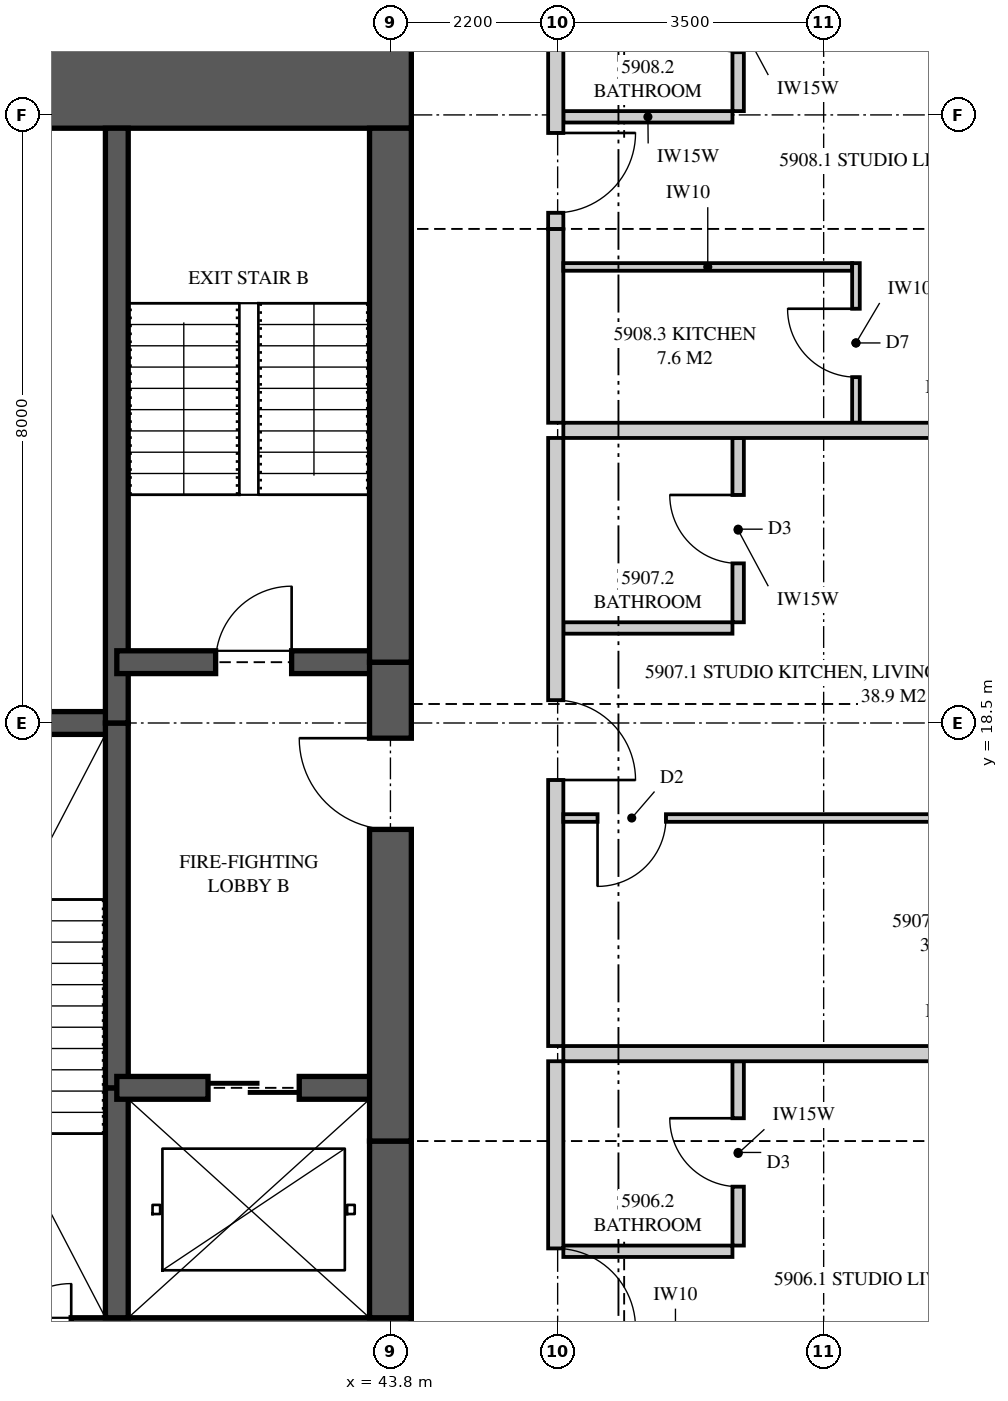
"""IFC4 building model, lengths in metres.
Left out: names, types, materials, properties, quantities, classifications, styles, units other than length and angle.
Written with IfcOpenShell. Run it as: python <this file> out.ifc"""

import sys

from ifc_helpers import new_model, si_unit, direction, frame, frame_2d, origin, place, context, subcontext, project, spatial, polyline, rectangle, outline, extrude, element, fill, save


model = new_model("IFC4")
c1 = context("Model", 3, precision=1e-05, world=origin(), true_north=direction((0.0, 1.0)))
c2 = subcontext(c1, "Body", "Model", "MODEL_VIEW")
j1 = project(units=[si_unit("LENGTHUNIT", "METRE"), si_unit("PLANEANGLEUNIT", "RADIAN")], contexts=[c1])
p1 = place(None, origin())
s1 = spatial("IfcSite", under=j1, at=p1, CompositionType="ELEMENT")
p2 = place(p1, origin())
s2 = spatial("IfcBuilding", under=s1, at=p2, CompositionType="ELEMENT")
p3 = place(p2, frame((0.0, 0.0, 217.95)))
s3 = spatial("IfcBuildingStorey", under=s2, at=p3, CompositionType="ELEMENT", Elevation=217.95)
p4 = place(p3, frame((35.9, 10.125, 0.0), z_axis=(0.0, 0.0, 1.0), x_axis=(1.0, 0.0, 0.0)))
e1 = element("IfcWall", 1, at=p4, inside=s3, PredefinedType="SHEAR", context=c2, shape_type="SweptSolid", body=[
    extrude(rectangle(XDim=8.175, YDim=1.1, at=frame_2d((4.087, 0.0))), origin(), (0.0, 0.0, 1.0), 3.5),
])
p5 = place(p4, frame((2.7, 0.0, 0.0)))
e2 = element("IfcOpeningElement", 2, at=p5, cuts=e1, PredefinedType="OPENING", context=c2, shape_type="SweptSolid", body=[
    extrude(rectangle(XDim=1.0, YDim=2.1, at=frame_2d((0.5, 1.05))), frame((0.0, 0.56, 0.0), z_axis=(0.0, -1.0, 0.0), x_axis=(1.0, 0.0, 0.0)), (0.0, 0.0, 1.0), 1.12),
])
p6 = place(p3, frame((44.075, 26.875, 0.0), z_axis=(0.0, 0.0, 1.0), x_axis=(-1.0, 0.0, 0.0)))
e3 = element("IfcWall", 3, at=p6, inside=s3, PredefinedType="SHEAR", context=c2, shape_type="SweptSolid", body=[
    extrude(rectangle(XDim=8.175, YDim=1.1, at=frame_2d((4.087, 0.0))), origin(), (0.0, 0.0, 1.0), 3.5),
])
p7 = place(p6, frame((5.575, 0.0, 0.0)))
e4 = element("IfcOpeningElement", 4, at=p7, cuts=e3, PredefinedType="OPENING", context=c2, shape_type="SweptSolid", body=[
    extrude(rectangle(XDim=0.9, YDim=2.1, at=frame_2d((0.45, 1.05))), frame((0.0, 0.56, 0.0), z_axis=(0.0, -1.0, 0.0), x_axis=(1.0, 0.0, 0.0)), (0.0, 0.0, 1.0), 1.12),
])
p8 = place(p3, frame((43.8, 10.675, 0.0), z_axis=(0.0, 0.0, 1.0), x_axis=(0.0, 1.0, 0.0)))
e5 = element("IfcWall", 5, at=p8, inside=s3, PredefinedType="SHEAR", context=c2, shape_type="SweptSolid", body=[
    extrude(rectangle(XDim=2.325, YDim=0.55, at=frame_2d((1.163, 0.0))), origin(), (0.0, 0.0, 1.0), 3.5),
])
p9 = place(p3, frame((43.8, 13.0, 0.0), z_axis=(0.0, 0.0, 1.0), x_axis=(0.0, 1.0, 0.0)))
e6 = element("IfcWall", 6, at=p9, inside=s3, PredefinedType="SHEAR", context=c2, shape_type="SweptSolid", body=[
    extrude(rectangle(XDim=6.3, YDim=0.55, at=frame_2d((3.15, 0.0))), origin(), (0.0, 0.0, 1.0), 3.5),
])
p10 = place(p9, frame((4.1, 0.0, 0.0)))
e7 = element("IfcOpeningElement", 7, at=p10, cuts=e6, PredefinedType="OPENING", context=c2, shape_type="SweptSolid", body=[
    extrude(rectangle(XDim=1.2, YDim=2.2, at=frame_2d((0.6, 1.1))), frame((0.0, 0.285, 0.0), z_axis=(0.0, -1.0, 0.0), x_axis=(1.0, 0.0, 0.0)), (0.0, 0.0, 1.0), 0.57),
])
p11 = place(p3, frame((43.8, 19.3, 0.0), z_axis=(0.0, 0.0, 1.0), x_axis=(0.0, 1.0, 0.0)))
e8 = element("IfcWall", 8, at=p11, inside=s3, PredefinedType="SHEAR", context=c2, shape_type="SweptSolid", body=[
    extrude(rectangle(XDim=7.025, YDim=0.55, at=frame_2d((3.512, 0.0))), origin(), (0.0, 0.0, 1.0), 3.5),
])
p12 = place(p3, frame((40.2, 10.675, 0.0), z_axis=(0.0, 0.0, 1.0), x_axis=(0.0, 1.0, 0.0)))
e9 = element("IfcWall", 9, at=p12, inside=s3, PredefinedType="SHEAR", context=c2, shape_type="SweptSolid", body=[
    extrude(rectangle(XDim=3.025, YDim=0.3, at=frame_2d((1.512, 0.0))), origin(), (0.0, 0.0, 1.0), 3.5),
])
p13 = place(p3, frame((40.2, 13.7, 0.0), z_axis=(0.0, 0.0, 1.0), x_axis=(0.0, 1.0, 0.0)))
e10 = element("IfcWall", 10, at=p13, inside=s3, PredefinedType="SHEAR", context=c2, shape_type="SweptSolid", body=[
    extrude(rectangle(XDim=4.8, YDim=0.3, at=frame_2d((2.4, 0.0))), origin(), (0.0, 0.0, 1.0), 3.5),
])
p14 = place(p3, frame((40.2, 18.5, 0.0), z_axis=(0.0, 0.0, 1.0), x_axis=(0.0, 1.0, 0.0)))
e11 = element("IfcWall", 11, at=p14, inside=s3, PredefinedType="SHEAR", context=c2, shape_type="SweptSolid", body=[
    extrude(rectangle(XDim=7.825, YDim=0.3, at=frame_2d((3.913, 0.0))), origin(), (0.0, 0.0, 1.0), 3.5),
])
p15 = place(p3, frame((35.9, 18.5, 0.0), z_axis=(0.0, 0.0, 1.0), x_axis=(1.0, 0.0, 0.0)))
e12 = element("IfcWall", 12, at=p15, inside=s3, PredefinedType="SHEAR", context=c2, shape_type="SweptSolid", body=[
    extrude(rectangle(XDim=4.3, YDim=0.3, at=frame_2d((2.15, 0.0))), origin(), (0.0, 0.0, 1.0), 3.5),
])
p16 = place(p3, frame((40.2, 13.7, 0.0), z_axis=(0.0, 0.0, 1.0), x_axis=(1.0, 0.0, 0.0)))
e13 = element("IfcWall", 13, at=p16, inside=s3, PredefinedType="SHEAR", context=c2, shape_type="SweptSolid", body=[
    extrude(rectangle(XDim=3.6, YDim=0.3, at=frame_2d((1.8, 0.0))), origin(), (0.0, 0.0, 1.0), 3.5),
])
p17 = place(p16, frame((1.2, 0.0, 0.0)))
e14 = element("IfcOpeningElement", 14, at=p17, cuts=e13, PredefinedType="OPENING", context=c2, shape_type="SweptSolid", body=[
    extrude(rectangle(XDim=1.2, YDim=2.1, at=frame_2d((0.6, 1.05))), frame((0.0, 0.16, 0.0), z_axis=(0.0, -1.0, 0.0), x_axis=(1.0, 0.0, 0.0)), (0.0, 0.0, 1.0), 0.32),
])
p18 = place(p3, frame((40.2, 19.3, 0.0), z_axis=(0.0, 0.0, 1.0), x_axis=(1.0, 0.0, 0.0)))
e15 = element("IfcWall", 15, at=p18, inside=s3, PredefinedType="SHEAR", context=c2, shape_type="SweptSolid", body=[
    extrude(rectangle(XDim=3.6, YDim=0.3, at=frame_2d((1.8, 0.0))), origin(), (0.0, 0.0, 1.0), 3.5),
])
p19 = place(p18, frame((1.3, 0.0, 0.0)))
e16 = element("IfcOpeningElement", 16, at=p19, cuts=e15, PredefinedType="OPENING", context=c2, shape_type="SweptSolid", body=[
    extrude(rectangle(XDim=1.0, YDim=2.1, at=frame_2d((0.5, 1.05))), frame((0.0, 0.16, 0.0), z_axis=(0.0, -1.0, 0.0), x_axis=(1.0, 0.0, 0.0)), (0.0, 0.0, 1.0), 0.32),
])
p20 = place(p3, frame((56.325, 14.15, 0.0), z_axis=(0.0, 0.0, 1.0), x_axis=(-1.0, 0.0, 0.0)))
e17 = element("IfcWall", 17, at=p20, inside=s3, PredefinedType="PARTITIONING", context=c2, shape_type="SweptSolid", body=[
    extrude(outline(polyline([(0.529, 2.3), (0.0, 2.3), (0.0, 0.0), (0.529, 0.0), (0.529, 0.28), (1.021, 0.28), (1.021, 0.0), (10.25, 0.0), (10.25, 2.66), (1.685, 2.66), (1.685, 2.3), (1.021, 2.3), (1.021, 1.87), (0.529, 1.87), (0.529, 2.3)])), frame((0.0, 0.1, 0.0), z_axis=(0.0, -1.0, 0.0), x_axis=(1.0, 0.0, 0.0)), (0.0, 0.0, 1.0), 0.2),
])
p21 = place(p3, frame((45.975, 8.025, 0.0), z_axis=(0.0, 0.0, 1.0), x_axis=(0.0, 1.0, 0.0)))
e18 = element("IfcWall", 18, at=p21, inside=s3, PredefinedType="PARTITIONING", context=c2, shape_type="SweptSolid", body=[
    extrude(outline(polyline([(0.0, 0.0), (6.025, 0.0), (6.025, 3.26), (6.025, 2.66), (5.085, 2.66), (0.0, 2.66), (0.0, 3.26), (0.0, 0.0)])), frame((0.0, 0.1, 0.0), z_axis=(0.0, -1.0, 0.0), x_axis=(1.0, 0.0, 0.0)), (0.0, 0.0, 1.0), 0.2),
])
p22 = place(p21, frame((2.512, 0.0, 0.0)))
e19 = element("IfcOpeningElement", 19, at=p22, cuts=e18, PredefinedType="OPENING", context=c2, shape_type="SweptSolid", body=[
    extrude(rectangle(XDim=1.05, YDim=2.2, at=frame_2d((0.525, 1.1))), frame((0.0, 0.11, 0.0), z_axis=(0.0, -1.0, 0.0), x_axis=(1.0, 0.0, 0.0)), (0.0, 0.0, 1.0), 0.22),
])
p23 = place(p3, frame((48.375, 11.625, 0.0), z_axis=(0.0, 0.0, 1.0), x_axis=(0.0, 1.0, 0.0)))
e20 = element("IfcWall", 20, at=p23, inside=s3, PredefinedType="PLUMBINGWALL", context=c2, shape_type="SweptSolid", body=[
    extrude(outline(polyline([(0.0, 0.0), (2.425, 0.0), (2.425, 3.26), (2.425, 2.66), (0.09, 2.66), (0.09, 3.26), (0.0, 3.26), (0.0, 0.0)])), frame((0.0, 0.075, 0.0), z_axis=(0.0, -1.0, 0.0), x_axis=(1.0, 0.0, 0.0)), (0.0, 0.0, 1.0), 0.15),
])
p24 = place(p23, frame((0.775, 0.0, 0.0)))
e21 = element("IfcOpeningElement", 21, at=p24, cuts=e20, PredefinedType="OPENING", context=c2, shape_type="SweptSolid", body=[
    extrude(rectangle(XDim=0.9, YDim=2.1, at=frame_2d((0.45, 1.05))), frame((0.0, 0.085, 0.0), z_axis=(0.0, -1.0, 0.0), x_axis=(1.0, 0.0, 0.0)), (0.0, 0.0, 1.0), 0.17),
])
p25 = place(p3, frame((48.3, 11.55, 0.0), z_axis=(0.0, 0.0, 1.0), x_axis=(-1.0, 0.0, 0.0)))
e22 = element("IfcWall", 22, at=p25, inside=s3, PredefinedType="PLUMBINGWALL", context=c2, shape_type="SweptSolid", body=[
    extrude(outline(polyline([(0.0, 0.0), (2.225, 0.0), (2.225, 3.26), (2.225, 2.66), (0.14, 2.66), (0.14, 3.26), (0.0, 3.26), (0.0, 0.0)])), frame((0.0, 0.075, 0.0), z_axis=(0.0, -1.0, 0.0), x_axis=(1.0, 0.0, 0.0)), (0.0, 0.0, 1.0), 0.15),
])
p26 = place(p3, frame((56.325, 22.35, 0.0), z_axis=(0.0, 0.0, 1.0), x_axis=(-1.0, 0.0, 0.0)))
e23 = element("IfcWall", 23, at=p26, inside=s3, PredefinedType="PARTITIONING", context=c2, shape_type="SweptSolid", body=[
    extrude(outline(polyline([(0.0, 0.0), (10.25, 0.0), (10.25, 3.26), (1.685, 3.26), (1.685, 2.3), (0.0, 2.3), (0.0, 3.26), (0.0, 0.0)])), frame((0.0, 0.1, 0.0), z_axis=(0.0, -1.0, 0.0), x_axis=(1.0, 0.0, 0.0)), (0.0, 0.0, 1.0), 0.2),
])
p27 = place(p3, frame((45.975, 14.25, 0.0), z_axis=(0.0, 0.0, 1.0), x_axis=(0.0, 1.0, 0.0)))
e24 = element("IfcWall", 24, at=p27, inside=s3, PredefinedType="PARTITIONING", context=c2, shape_type="SweptSolid", body=[
    extrude(outline(polyline([(0.0, 0.0), (8.0, 0.0), (8.0, 3.26), (5.81, 3.26), (5.81, 2.66), (3.19, 2.66), (3.19, 3.26), (0.06, 3.26), (0.06, 2.66), (0.0, 2.66), (0.0, 3.26), (0.0, 0.0)])), frame((0.0, 0.1, 0.0), z_axis=(0.0, -1.0, 0.0), x_axis=(1.0, 0.0, 0.0)), (0.0, 0.0, 1.0), 0.2),
])
p28 = place(p27, frame((3.5, 0.0, 0.0)))
e25 = element("IfcOpeningElement", 25, at=p28, cuts=e24, PredefinedType="OPENING", context=c2, shape_type="SweptSolid", body=[
    extrude(rectangle(XDim=1.05, YDim=2.2, at=frame_2d((0.525, 1.1))), frame((0.0, 0.11, 0.0), z_axis=(0.0, -1.0, 0.0), x_axis=(1.0, 0.0, 0.0)), (0.0, 0.0, 1.0), 0.22),
])
p29 = place(p3, frame((48.375, 19.825, 0.0), z_axis=(0.0, 0.0, 1.0), x_axis=(0.0, 1.0, 0.0)))
e26 = element("IfcWall", 26, at=p29, inside=s3, PredefinedType="PLUMBINGWALL", context=c2, shape_type="SweptSolid", body=[
    extrude(outline(polyline([(0.0, 0.0), (2.425, 0.0), (2.425, 3.26), (0.21, 3.26), (0.21, 2.66), (0.0, 2.66), (0.0, 3.26), (0.0, 0.0)])), frame((0.0, 0.075, 0.0), z_axis=(0.0, -1.0, 0.0), x_axis=(1.0, 0.0, 0.0)), (0.0, 0.0, 1.0), 0.15),
])
p30 = place(p29, frame((0.775, 0.0, 0.0)))
e27 = element("IfcOpeningElement", 27, at=p30, cuts=e26, PredefinedType="OPENING", context=c2, shape_type="SweptSolid", body=[
    extrude(rectangle(XDim=0.9, YDim=2.1, at=frame_2d((0.45, 1.05))), frame((0.0, 0.085, 0.0), z_axis=(0.0, -1.0, 0.0), x_axis=(1.0, 0.0, 0.0)), (0.0, 0.0, 1.0), 0.17),
])
p31 = place(p3, frame((48.3, 19.75, 0.0), z_axis=(0.0, 0.0, 1.0), x_axis=(-1.0, 0.0, 0.0)))
e28 = element("IfcWall", 28, at=p31, inside=s3, PredefinedType="PLUMBINGWALL", context=c2, shape_type="SweptSolid", body=[
    extrude(outline(polyline([(0.0, 0.0), (2.225, 0.0), (2.225, 3.26), (2.225, 2.66), (0.0, 2.66), (0.0, 3.26), (0.0, 0.0)])), frame((0.0, 0.075, 0.0), z_axis=(0.0, -1.0, 0.0), x_axis=(1.0, 0.0, 0.0)), (0.0, 0.0, 1.0), 0.15),
])
p32 = place(p3, frame((56.325, 17.25, 0.0), z_axis=(0.0, 0.0, 1.0), x_axis=(-1.0, 0.0, 0.0)))
e29 = element("IfcWall", 29, at=p32, inside=s3, PredefinedType="PARTITIONING", context=c2, shape_type="SweptSolid", body=[
    extrude(outline(polyline([(0.0, 0.0), (10.25, 0.0), (10.25, 3.26), (1.635, 3.26), (1.635, 2.3), (0.0, 2.3), (0.0, 3.26), (0.0, 0.0)])), frame((0.0, 0.05, 0.0), z_axis=(0.0, -1.0, 0.0), x_axis=(1.0, 0.0, 0.0)), (0.0, 0.0, 1.0), 0.1),
])
p33 = place(p32, frame((8.9, 0.0, 0.0)))
e30 = element("IfcOpeningElement", 30, at=p33, cuts=e29, PredefinedType="OPENING", context=c2, shape_type="SweptSolid", body=[
    extrude(rectangle(XDim=0.9, YDim=2.1, at=frame_2d((0.45, 1.05))), frame((0.0, 0.06, 0.0), z_axis=(0.0, -1.0, 0.0), x_axis=(1.0, 0.0, 0.0)), (0.0, 0.0, 1.0), 0.12),
])
p34 = place(p3, frame((45.975, 22.45, 0.0), z_axis=(0.0, 0.0, 1.0), x_axis=(0.0, 1.0, 0.0)))
e31 = element("IfcWall", 31, at=p34, inside=s3, PredefinedType="PARTITIONING", context=c2, shape_type="SweptSolid", body=[
    extrude(outline(polyline([(0.0, 0.0), (2.55, 0.0), (2.55, 2.66), (1.24, 2.66), (1.24, 3.26), (0.0, 3.26), (0.0, 0.0)])), frame((0.0, 0.1, 0.0), z_axis=(0.0, -1.0, 0.0), x_axis=(1.0, 0.0, 0.0)), (0.0, 0.0, 1.0), 0.2),
])
p35 = place(p3, frame((45.975, 25.0, 0.0), z_axis=(0.0, 0.0, 1.0), x_axis=(0.0, 1.0, 0.0)))
e32 = element("IfcWall", 32, at=p35, inside=s3, PredefinedType="PARTITIONING", context=c2, shape_type="SweptSolid", body=[
    extrude(rectangle(XDim=3.975, YDim=0.2, at=frame_2d((1.988, 0.0))), origin(), (0.0, 0.0, 1.0), 2.66),
])
p36 = place(p35, frame((0.212, 0.0, 0.0)))
e33 = element("IfcOpeningElement", 33, at=p36, cuts=e32, PredefinedType="OPENING", context=c2, shape_type="SweptSolid", body=[
    extrude(rectangle(XDim=1.05, YDim=2.2, at=frame_2d((0.525, 1.1))), frame((0.0, 0.11, 0.0), z_axis=(0.0, -1.0, 0.0), x_axis=(1.0, 0.0, 0.0)), (0.0, 0.0, 1.0), 0.22),
])
p37 = place(p3, frame((48.375, 26.55, 0.0), z_axis=(0.0, 0.0, 1.0), x_axis=(0.0, 1.0, 0.0)))
e34 = element("IfcWall", 34, at=p37, inside=s3, PredefinedType="PLUMBINGWALL", context=c2, shape_type="SweptSolid", body=[
    extrude(rectangle(XDim=2.425, YDim=0.15, at=frame_2d((1.212, 0.0))), origin(), (0.0, 0.0, 1.0), 3.26),
])
p38 = place(p37, frame((0.775, 0.0, 0.0)))
e35 = element("IfcOpeningElement", 35, at=p38, cuts=e34, PredefinedType="OPENING", context=c2, shape_type="SweptSolid", body=[
    extrude(rectangle(XDim=0.9, YDim=2.1, at=frame_2d((0.45, 1.05))), frame((0.0, 0.085, 0.0), z_axis=(0.0, -1.0, 0.0), x_axis=(1.0, 0.0, 0.0)), (0.0, 0.0, 1.0), 0.17),
])
p39 = place(p3, frame((48.3, 26.475, 0.0), z_axis=(0.0, 0.0, 1.0), x_axis=(-1.0, 0.0, 0.0)))
e36 = element("IfcWall", 36, at=p39, inside=s3, PredefinedType="PLUMBINGWALL", context=c2, shape_type="SweptSolid", body=[
    extrude(outline(polyline([(0.0, 0.0), (2.225, 0.0), (2.225, 3.26), (2.225, 2.66), (0.14, 2.66), (0.14, 3.26), (0.0, 3.26), (0.0, 0.0)])), frame((0.0, 0.075, 0.0), z_axis=(0.0, -1.0, 0.0), x_axis=(1.0, 0.0, 0.0)), (0.0, 0.0, 1.0), 0.15),
])
p40 = place(p3, frame((49.925, 22.45, 0.0), z_axis=(0.0, 0.0, 1.0), x_axis=(0.0, 1.0, 0.0)))
e37 = element("IfcWall", 37, at=p40, inside=s3, PredefinedType="PARTITIONING", context=c2, shape_type="SweptSolid", body=[
    extrude(outline(polyline([(0.0, 0.0), (2.1, 0.0), (2.1, 3.26), (2.1, 2.66), (1.29, 2.66), (1.29, 3.26), (0.0, 3.26), (0.0, 0.0)])), frame((0.0, 0.05, 0.0), z_axis=(0.0, -1.0, 0.0), x_axis=(1.0, 0.0, 0.0)), (0.0, 0.0, 1.0), 0.1),
])
p41 = place(p40, frame((0.6, 0.0, 0.0)))
e38 = element("IfcOpeningElement", 38, at=p41, cuts=e37, PredefinedType="OPENING", context=c2, shape_type="SweptSolid", body=[
    extrude(rectangle(XDim=0.9, YDim=2.1, at=frame_2d((0.45, 1.05))), frame((0.0, 0.06, 0.0), z_axis=(0.0, -1.0, 0.0), x_axis=(1.0, 0.0, 0.0)), (0.0, 0.0, 1.0), 0.12),
])
p42 = place(p3, frame((46.075, 24.5, 0.0), z_axis=(0.0, 0.0, 1.0), x_axis=(1.0, 0.0, 0.0)))
e39 = element("IfcWall", 39, at=p42, inside=s3, PredefinedType="PARTITIONING", context=c2, shape_type="SweptSolid", body=[
    extrude(outline(polyline([(0.0, 0.0), (3.8, 0.0), (3.8, 3.26), (3.8, 2.66), (0.0, 2.66), (0.0, 3.26), (0.0, 0.0)])), frame((0.0, 0.05, 0.0), z_axis=(0.0, -1.0, 0.0), x_axis=(1.0, 0.0, 0.0)), (0.0, 0.0, 1.0), 0.1),
])
p43 = place(p22, frame((1.05, 0.0, 0.0), z_axis=(0.0, 0.0, 1.0), x_axis=(-1.0, 0.0, 0.0)))
e40 = element("IfcDoor", 40, at=p43, inside=s3, OperationType="SINGLE_SWING_RIGHT", PredefinedType="DOOR", context=c2, shape_type="SweptSolid", body=[
    extrude(rectangle(XDim=1.05, YDim=2.2, at=frame_2d((0.525, 1.1))), frame((0.0, 0.025, 0.0), z_axis=(0.0, -1.0, 0.0), x_axis=(1.0, 0.0, 0.0)), (0.0, 0.0, 1.0), 0.05),
])
fill(e19, e40)
p44 = place(p24, origin())
e41 = element("IfcDoor", 41, at=p44, inside=s3, OperationType="SINGLE_SWING_RIGHT", PredefinedType="DOOR", context=c2, shape_type="SweptSolid", body=[
    extrude(rectangle(XDim=0.9, YDim=2.1, at=frame_2d((0.45, 1.05))), frame((0.0, 0.025, 0.0), z_axis=(0.0, -1.0, 0.0), x_axis=(1.0, 0.0, 0.0)), (0.0, 0.0, 1.0), 0.05),
])
fill(e21, e41)
p45 = place(p28, frame((1.05, 0.0, 0.0), z_axis=(0.0, 0.0, 1.0), x_axis=(-1.0, 0.0, 0.0)))
e42 = element("IfcDoor", 42, at=p45, inside=s3, OperationType="SINGLE_SWING_RIGHT", PredefinedType="DOOR", context=c2, shape_type="SweptSolid", body=[
    extrude(rectangle(XDim=1.05, YDim=2.2, at=frame_2d((0.525, 1.1))), frame((0.0, 0.025, 0.0), z_axis=(0.0, -1.0, 0.0), x_axis=(1.0, 0.0, 0.0)), (0.0, 0.0, 1.0), 0.05),
])
fill(e25, e42)
p46 = place(p30, origin())
e43 = element("IfcDoor", 43, at=p46, inside=s3, OperationType="SINGLE_SWING_RIGHT", PredefinedType="DOOR", context=c2, shape_type="SweptSolid", body=[
    extrude(rectangle(XDim=0.9, YDim=2.1, at=frame_2d((0.45, 1.05))), frame((0.0, 0.025, 0.0), z_axis=(0.0, -1.0, 0.0), x_axis=(1.0, 0.0, 0.0)), (0.0, 0.0, 1.0), 0.05),
])
fill(e27, e43)
p47 = place(p33, origin())
e44 = element("IfcDoor", 44, at=p47, inside=s3, OperationType="SINGLE_SWING_RIGHT", PredefinedType="DOOR", context=c2, shape_type="SweptSolid", body=[
    extrude(rectangle(XDim=0.9, YDim=2.1, at=frame_2d((0.45, 1.05))), frame((0.0, 0.025, 0.0), z_axis=(0.0, -1.0, 0.0), x_axis=(1.0, 0.0, 0.0)), (0.0, 0.0, 1.0), 0.05),
])
fill(e30, e44)
p48 = place(p36, frame((1.05, 0.0, 0.0), z_axis=(0.0, 0.0, 1.0), x_axis=(-1.0, 0.0, 0.0)))
e45 = element("IfcDoor", 45, at=p48, inside=s3, OperationType="SINGLE_SWING_LEFT", PredefinedType="DOOR", context=c2, shape_type="SweptSolid", body=[
    extrude(rectangle(XDim=1.05, YDim=2.2, at=frame_2d((0.525, 1.1))), frame((0.0, 0.025, 0.0), z_axis=(0.0, -1.0, 0.0), x_axis=(1.0, 0.0, 0.0)), (0.0, 0.0, 1.0), 0.05),
])
fill(e33, e45)
p49 = place(p41, origin())
e46 = element("IfcDoor", 46, at=p49, inside=s3, OperationType="SINGLE_SWING_RIGHT", PredefinedType="DOOR", context=c2, shape_type="SweptSolid", body=[
    extrude(rectangle(XDim=0.9, YDim=2.1, at=frame_2d((0.45, 1.05))), frame((0.0, 0.025, 0.0), z_axis=(0.0, -1.0, 0.0), x_axis=(1.0, 0.0, 0.0)), (0.0, 0.0, 1.0), 0.05),
])
fill(e38, e46)
p50 = place(p19, origin())
e47 = element("IfcDoor", 47, at=p50, inside=s3, OperationType="SINGLE_SWING_RIGHT", PredefinedType="DOOR", context=c2, shape_type="SweptSolid", body=[
    extrude(rectangle(XDim=1.0, YDim=2.1, at=frame_2d((0.5, 1.05))), frame((0.0, 0.025, 0.0), z_axis=(0.0, -1.0, 0.0), x_axis=(1.0, 0.0, 0.0)), (0.0, 0.0, 1.0), 0.05),
])
fill(e16, e47)
p51 = place(p10, origin())
e48 = element("IfcDoor", 48, at=p51, inside=s3, OperationType="SINGLE_SWING_RIGHT", PredefinedType="DOOR", context=c2, shape_type="SweptSolid", body=[
    extrude(rectangle(XDim=1.2, YDim=2.2, at=frame_2d((0.6, 1.1))), frame((0.0, 0.025, 0.0), z_axis=(0.0, -1.0, 0.0), x_axis=(1.0, 0.0, 0.0)), (0.0, 0.0, 1.0), 0.05),
])
fill(e7, e48)
p52 = place(p17, origin())
e49 = element("IfcDoor", 49, at=p52, inside=s3, OperationType="SLIDING_TO_LEFT", PredefinedType="DOOR", context=c2, shape_type="SweptSolid", body=[
    extrude(rectangle(XDim=1.2, YDim=2.1, at=frame_2d((0.6, 1.05))), frame((0.0, 0.025, 0.0), z_axis=(0.0, -1.0, 0.0), x_axis=(1.0, 0.0, 0.0)), (0.0, 0.0, 1.0), 0.05),
])
fill(e14, e49)
save(model, sys.argv[1])
